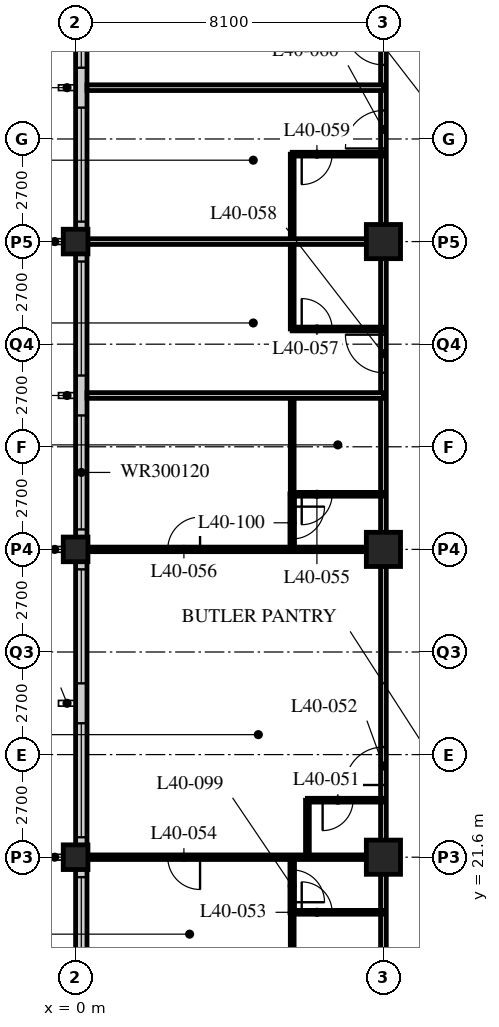
"""IFC4 building model, lengths in metres.
Left out: names, types, materials, properties, quantities, classifications, styles, units other than length and angle.
Written with IfcOpenShell. Run it as: python <this file> out.ifc"""

import sys

from ifc_helpers import new_model, si_unit, direction, frame, frame_2d, origin, origin_2d, place, context, subcontext, project, spatial, rectangle, hollow_rectangle, extrude, element, fill, save


model = new_model("IFC4")
c1 = context("Model", 3, precision=1e-05, world=origin(), true_north=direction((0.0, 1.0)))
c2 = subcontext(c1, "Body", "Model", "MODEL_VIEW")
j1 = project(units=[si_unit("LENGTHUNIT", "METRE"), si_unit("PLANEANGLEUNIT", "RADIAN")], contexts=[c1])
p1 = place(None, origin())
s1 = spatial("IfcSite", under=j1, at=p1, CompositionType="ELEMENT")
p2 = place(p1, origin())
s2 = spatial("IfcBuilding", under=s1, at=p2, CompositionType="ELEMENT")
p3 = place(p2, frame((0.0, 0.0, 154.4)))
s3 = spatial("IfcBuildingStorey", under=s2, at=p3, CompositionType="ELEMENT", Elevation=154.4)
for number, where, z_axis, x_axis in (
    (1, (0.0, 21.6, 0.0), (0.0, 0.0, 1.0), (1.0, 0.0, 0.0)),
    (2, (0.0, 29.7, 0.0), (0.0, 0.0, 1.0), (1.0, 0.0, 0.0)),
    (3, (0.0, 37.8, 0.0), (0.0, 0.0, 1.0), (1.0, 0.0, 0.0)),
):
    element("IfcColumn", number, at=place(p3, frame(where, z_axis=z_axis, x_axis=x_axis)), inside=s3, PredefinedType="COLUMN", context=c2, shape_type="SweptSolid", body=[
        extrude(hollow_rectangle(XDim=0.65, YDim=0.65, WallThickness=0.055, at=origin_2d()), origin(), (0.0, 0.0, 1.0), 3.4),
    ])
for number, where, z_axis, x_axis in (
    (4, (8.1, 21.6, 0.0), (0.0, 0.0, 1.0), (1.0, 0.0, 0.0)),
    (5, (8.1, 29.7, 0.0), (0.0, 0.0, 1.0), (1.0, 0.0, 0.0)),
    (6, (8.1, 37.8, 0.0), (0.0, 0.0, 1.0), (1.0, 0.0, 0.0)),
):
    element("IfcColumn", number, at=place(p3, frame(where, z_axis=z_axis, x_axis=x_axis)), inside=s3, PredefinedType="COLUMN", context=c2, shape_type="SweptSolid", body=[
        extrude(hollow_rectangle(XDim=0.9, YDim=0.9, WallThickness=0.1, at=origin_2d()), origin(), (0.0, 0.0, 1.0), 3.4),
    ])
p4 = place(p3, frame((0.15, 45.6, 0.0), z_axis=(0.0, 0.0, 1.0), x_axis=(0.0, -1.0, 0.0)))
e7 = element("IfcWall", 7, at=p4, inside=s3, PredefinedType="SOLIDWALL", context=c2, shape_type="SweptSolid", body=[
    extrude(rectangle(XDim=32.1, YDim=0.3, at=frame_2d((16.05, 0.0))), origin(), (0.0, 0.0, 1.0), 2.15),
])
p5 = place(p4, frame((0.225, 0.0, 0.9)))
e8 = element("IfcOpeningElement", 8, at=p5, cuts=e7, PredefinedType="OPENING", context=c2, shape_type="SweptSolid", body=[
    extrude(rectangle(XDim=3.0, YDim=1.2, at=frame_2d((1.5, 0.6))), frame((0.0, 0.16, 0.0), z_axis=(0.0, -1.0, 0.0), x_axis=(1.0, 0.0, 0.0)), (0.0, 0.0, 1.0), 0.32),
])
p6 = place(p4, frame((4.275, 0.0, 0.9)))
e9 = element("IfcOpeningElement", 9, at=p6, cuts=e7, PredefinedType="OPENING", context=c2, shape_type="SweptSolid", body=[
    extrude(rectangle(XDim=3.0, YDim=1.2, at=frame_2d((1.5, 0.6))), frame((0.0, 0.16, 0.0), z_axis=(0.0, -1.0, 0.0), x_axis=(1.0, 0.0, 0.0)), (0.0, 0.0, 1.0), 0.32),
])
p7 = place(p4, frame((8.325, 0.0, 0.9)))
e10 = element("IfcOpeningElement", 10, at=p7, cuts=e7, PredefinedType="OPENING", context=c2, shape_type="SweptSolid", body=[
    extrude(rectangle(XDim=3.0, YDim=1.2, at=frame_2d((1.5, 0.6))), frame((0.0, 0.16, 0.0), z_axis=(0.0, -1.0, 0.0), x_axis=(1.0, 0.0, 0.0)), (0.0, 0.0, 1.0), 0.32),
])
p8 = place(p4, frame((12.375, 0.0, 0.9)))
e11 = element("IfcOpeningElement", 11, at=p8, cuts=e7, PredefinedType="OPENING", context=c2, shape_type="SweptSolid", body=[
    extrude(rectangle(XDim=3.0, YDim=1.2, at=frame_2d((1.5, 0.6))), frame((0.0, 0.16, 0.0), z_axis=(0.0, -1.0, 0.0), x_axis=(1.0, 0.0, 0.0)), (0.0, 0.0, 1.0), 0.32),
])
p9 = place(p4, frame((16.425, 0.0, 0.9)))
e12 = element("IfcOpeningElement", 12, at=p9, cuts=e7, PredefinedType="OPENING", context=c2, shape_type="SweptSolid", body=[
    extrude(rectangle(XDim=3.0, YDim=1.2, at=frame_2d((1.5, 0.6))), frame((0.0, 0.16, 0.0), z_axis=(0.0, -1.0, 0.0), x_axis=(1.0, 0.0, 0.0)), (0.0, 0.0, 1.0), 0.32),
])
p10 = place(p4, frame((20.475, 0.0, 0.9)))
e13 = element("IfcOpeningElement", 13, at=p10, cuts=e7, PredefinedType="OPENING", context=c2, shape_type="SweptSolid", body=[
    extrude(rectangle(XDim=3.0, YDim=1.2, at=frame_2d((1.5, 0.6))), frame((0.0, 0.16, 0.0), z_axis=(0.0, -1.0, 0.0), x_axis=(1.0, 0.0, 0.0)), (0.0, 0.0, 1.0), 0.32),
])
p11 = place(p4, frame((24.525, 0.0, 0.9)))
e14 = element("IfcOpeningElement", 14, at=p11, cuts=e7, PredefinedType="OPENING", context=c2, shape_type="SweptSolid", body=[
    extrude(rectangle(XDim=3.0, YDim=1.2, at=frame_2d((1.5, 0.6))), frame((0.0, 0.16, 0.0), z_axis=(0.0, -1.0, 0.0), x_axis=(1.0, 0.0, 0.0)), (0.0, 0.0, 1.0), 0.32),
])
p12 = place(p4, frame((28.575, 0.0, 0.9)))
e15 = element("IfcOpeningElement", 15, at=p12, cuts=e7, PredefinedType="OPENING", context=c2, shape_type="SweptSolid", body=[
    extrude(rectangle(XDim=3.0, YDim=1.2, at=frame_2d((1.5, 0.6))), frame((0.0, 0.16, 0.0), z_axis=(0.0, -1.0, 0.0), x_axis=(1.0, 0.0, 0.0)), (0.0, 0.0, 1.0), 0.32),
])
p13 = place(p3, frame((8.1, 17.55, 0.0), z_axis=(0.0, 0.0, 1.0), x_axis=(0.0, 1.0, 0.0)))
e16 = element("IfcWall", 16, at=p13, inside=s3, PredefinedType="PARTITIONING", context=c2, shape_type="SweptSolid", body=[
    extrude(rectangle(XDim=28.35, YDim=0.15, at=frame_2d((14.175, 0.0))), origin(), (0.0, 0.0, 1.0), 2.15),
])
p14 = place(p13, frame((5.95, 0.0, 0.0)))
e17 = element("IfcOpeningElement", 17, at=p14, cuts=e16, PredefinedType="OPENING", context=c2, shape_type="SweptSolid", body=[
    extrude(rectangle(XDim=1.0, YDim=2.1, at=frame_2d((0.5, 1.05))), frame((0.0, 0.085, 0.0), z_axis=(0.0, -1.0, 0.0), x_axis=(1.0, 0.0, 0.0)), (0.0, 0.0, 1.0), 0.17),
])
p15 = place(p13, frame((16.8, 0.0, 0.0)))
e18 = element("IfcOpeningElement", 18, at=p15, cuts=e16, PredefinedType="OPENING", context=c2, shape_type="SweptSolid", body=[
    extrude(rectangle(XDim=1.0, YDim=2.1, at=frame_2d((0.5, 1.05))), frame((0.0, 0.085, 0.0), z_axis=(0.0, -1.0, 0.0), x_axis=(1.0, 0.0, 0.0)), (0.0, 0.0, 1.0), 0.17),
])
p16 = place(p13, frame((22.7, 0.0, 0.0)))
e19 = element("IfcOpeningElement", 19, at=p16, cuts=e16, PredefinedType="OPENING", context=c2, shape_type="SweptSolid", body=[
    extrude(rectangle(XDim=1.0, YDim=2.1, at=frame_2d((0.5, 1.05))), frame((0.0, 0.085, 0.0), z_axis=(0.0, -1.0, 0.0), x_axis=(1.0, 0.0, 0.0)), (0.0, 0.0, 1.0), 0.17),
])
p17 = place(p13, frame((24.9, 0.0, 0.0)))
e20 = element("IfcOpeningElement", 20, at=p17, cuts=e16, PredefinedType="OPENING", context=c2, shape_type="SweptSolid", body=[
    extrude(rectangle(XDim=1.0, YDim=2.1, at=frame_2d((0.5, 1.05))), frame((0.0, 0.085, 0.0), z_axis=(0.0, -1.0, 0.0), x_axis=(1.0, 0.0, 0.0)), (0.0, 0.0, 1.0), 0.17),
])
p18 = place(p3, frame((6.1, 21.6, 0.0), z_axis=(0.0, 0.0, 1.0), x_axis=(0.0, 1.0, 0.0)))
e21 = element("IfcWall", 21, at=p18, inside=s3, PredefinedType="PARTITIONING", context=c2, shape_type="SweptSolid", body=[
    extrude(rectangle(XDim=1.5, YDim=0.1, at=frame_2d((0.75, 0.0))), origin(), (0.0, 0.0, 1.0), 3.15),
])
p19 = place(p3, frame((8.1, 23.1, 0.0), z_axis=(0.0, 0.0, 1.0), x_axis=(-1.0, 0.0, 0.0)))
e22 = element("IfcWall", 22, at=p19, inside=s3, PredefinedType="PARTITIONING", context=c2, shape_type="SweptSolid", body=[
    extrude(rectangle(XDim=2.0, YDim=0.1, at=frame_2d((1.0, 0.0))), origin(), (0.0, 0.0, 1.0), 3.15),
])
p20 = place(p19, frame((0.8, 0.0, 0.0)))
e23 = element("IfcOpeningElement", 23, at=p20, cuts=e22, PredefinedType="OPENING", context=c2, shape_type="SweptSolid", body=[
    extrude(rectangle(XDim=0.8, YDim=2.1, at=frame_2d((0.4, 1.05))), frame((0.0, 0.06, 0.0), z_axis=(0.0, -1.0, 0.0), x_axis=(1.0, 0.0, 0.0)), (0.0, 0.0, 1.0), 0.12),
])
p21 = place(p3, frame((5.7, 17.55, 0.0), z_axis=(0.0, 0.0, 1.0), x_axis=(0.0, 1.0, 0.0)))
e24 = element("IfcWall", 24, at=p21, inside=s3, PredefinedType="PARTITIONING", context=c2, shape_type="SweptSolid", body=[
    extrude(rectangle(XDim=2.6, YDim=0.1, at=frame_2d((1.3, 0.0))), origin(), (0.0, 0.0, 1.0), 3.15),
])
p22 = place(p3, frame((8.1, 20.15, 0.0), z_axis=(0.0, 0.0, 1.0), x_axis=(-1.0, 0.0, 0.0)))
e25 = element("IfcWall", 25, at=p22, inside=s3, PredefinedType="PARTITIONING", context=c2, shape_type="SweptSolid", body=[
    extrude(rectangle(XDim=2.4, YDim=0.1, at=frame_2d((1.2, 0.0))), origin(), (0.0, 0.0, 1.0), 3.15),
])
p23 = place(p22, frame((1.35, 0.0, 0.0)))
e26 = element("IfcOpeningElement", 26, at=p23, cuts=e25, PredefinedType="OPENING", context=c2, shape_type="SweptSolid", body=[
    extrude(rectangle(XDim=0.8, YDim=2.1, at=frame_2d((0.4, 1.05))), frame((0.0, 0.06, 0.0), z_axis=(0.0, -1.0, 0.0), x_axis=(1.0, 0.0, 0.0)), (0.0, 0.0, 1.0), 0.12),
])
p24 = place(p3, frame((8.1, 21.6, 0.0), z_axis=(0.0, 0.0, 1.0), x_axis=(-1.0, 0.0, 0.0)))
e27 = element("IfcWall", 27, at=p24, inside=s3, PredefinedType="PARTITIONING", context=c2, shape_type="SweptSolid", body=[
    extrude(rectangle(XDim=7.8, YDim=0.12, at=frame_2d((3.9, 0.0))), origin(), (0.0, 0.0, 1.0), 2.15),
])
p25 = place(p24, frame((4.825, 0.0, 0.0)))
e28 = element("IfcOpeningElement", 28, at=p25, cuts=e27, PredefinedType="OPENING", context=c2, shape_type="SweptSolid", body=[
    extrude(rectangle(XDim=0.85, YDim=2.1, at=frame_2d((0.425, 1.05))), frame((0.0, 0.07, 0.0), z_axis=(0.0, -1.0, 0.0), x_axis=(1.0, 0.0, 0.0)), (0.0, 0.0, 1.0), 0.14),
])
p26 = place(p3, frame((5.7, 31.15, 0.0), z_axis=(0.0, 0.0, 1.0), x_axis=(0.0, 1.0, 0.0)))
e29 = element("IfcWall", 29, at=p26, inside=s3, PredefinedType="PARTITIONING", context=c2, shape_type="SweptSolid", body=[
    extrude(rectangle(XDim=2.6, YDim=0.1, at=frame_2d((1.3, 0.0))), origin(), (0.0, 0.0, 1.0), 3.15),
])
p27 = place(p3, frame((8.1, 31.15, 0.0), z_axis=(0.0, 0.0, 1.0), x_axis=(-1.0, 0.0, 0.0)))
e30 = element("IfcWall", 30, at=p27, inside=s3, PredefinedType="PARTITIONING", context=c2, shape_type="SweptSolid", body=[
    extrude(rectangle(XDim=2.4, YDim=0.1, at=frame_2d((1.2, 0.0))), origin(), (0.0, 0.0, 1.0), 3.15),
])
p28 = place(p27, frame((1.35, 0.0, 0.0)))
e31 = element("IfcOpeningElement", 31, at=p28, cuts=e30, PredefinedType="OPENING", context=c2, shape_type="SweptSolid", body=[
    extrude(rectangle(XDim=0.8, YDim=2.1, at=frame_2d((0.4, 1.05))), frame((0.0, 0.06, 0.0), z_axis=(0.0, -1.0, 0.0), x_axis=(1.0, 0.0, 0.0)), (0.0, 0.0, 1.0), 0.12),
])
p29 = place(p3, frame((8.1, 29.7, 0.0), z_axis=(0.0, 0.0, 1.0), x_axis=(-1.0, 0.0, 0.0)))
e32 = element("IfcWall", 32, at=p29, inside=s3, PredefinedType="PARTITIONING", context=c2, shape_type="SweptSolid", body=[
    extrude(rectangle(XDim=7.8, YDim=0.12, at=frame_2d((3.9, 0.0))), origin(), (0.0, 0.0, 1.0), 2.38),
])
p30 = place(p29, frame((4.825, 0.0, 0.0)))
e33 = element("IfcOpeningElement", 33, at=p30, cuts=e32, PredefinedType="OPENING", context=c2, shape_type="SweptSolid", body=[
    extrude(rectangle(XDim=0.85, YDim=2.1, at=frame_2d((0.425, 1.05))), frame((0.0, 0.07, 0.0), z_axis=(0.0, -1.0, 0.0), x_axis=(1.0, 0.0, 0.0)), (0.0, 0.0, 1.0), 0.14),
])
p31 = place(p3, frame((8.1, 33.75, 0.0), z_axis=(0.0, 0.0, 1.0), x_axis=(-1.0, 0.0, 0.0)))
e34 = element("IfcWall", 34, at=p31, inside=s3, PredefinedType="PARTITIONING", context=c2, shape_type="SweptSolid", body=[
    extrude(rectangle(XDim=7.8, YDim=0.15, at=frame_2d((3.9, 0.0))), origin(), (0.0, 0.0, 1.0), 3.15),
])
p32 = place(p3, frame((5.7, 35.5, 0.0), z_axis=(0.0, 0.0, 1.0), x_axis=(0.0, 1.0, 0.0)))
e35 = element("IfcWall", 35, at=p32, inside=s3, PredefinedType="PARTITIONING", context=c2, shape_type="SweptSolid", body=[
    extrude(rectangle(XDim=4.6, YDim=0.1, at=frame_2d((2.3, 0.0))), origin(), (0.0, 0.0, 1.0), 3.15),
])
p33 = place(p3, frame((8.1, 35.5, 0.0), z_axis=(0.0, 0.0, 1.0), x_axis=(-1.0, 0.0, 0.0)))
e36 = element("IfcWall", 36, at=p33, inside=s3, PredefinedType="PARTITIONING", context=c2, shape_type="SweptSolid", body=[
    extrude(rectangle(XDim=2.4, YDim=0.1, at=frame_2d((1.2, 0.0))), origin(), (0.0, 0.0, 1.0), 3.15),
])
p34 = place(p33, frame((1.35, 0.0, 0.0)))
e37 = element("IfcOpeningElement", 37, at=p34, cuts=e36, PredefinedType="OPENING", context=c2, shape_type="SweptSolid", body=[
    extrude(rectangle(XDim=0.8, YDim=2.1, at=frame_2d((0.4, 1.05))), frame((0.0, 0.06, 0.0), z_axis=(0.0, -1.0, 0.0), x_axis=(1.0, 0.0, 0.0)), (0.0, 0.0, 1.0), 0.12),
])
p35 = place(p3, frame((8.1, 37.8, 0.0), z_axis=(0.0, 0.0, 1.0), x_axis=(-1.0, 0.0, 0.0)))
e38 = element("IfcWall", 38, at=p35, inside=s3, PredefinedType="PARTITIONING", context=c2, shape_type="SweptSolid", body=[
    extrude(rectangle(XDim=7.8, YDim=0.15, at=frame_2d((3.9, 0.0))), origin(), (0.0, 0.0, 1.0), 2.38),
])
p36 = place(p3, frame((8.1, 40.1, 0.0), z_axis=(0.0, 0.0, 1.0), x_axis=(-1.0, 0.0, 0.0)))
e39 = element("IfcWall", 39, at=p36, inside=s3, PredefinedType="PARTITIONING", context=c2, shape_type="SweptSolid", body=[
    extrude(rectangle(XDim=2.4, YDim=0.1, at=frame_2d((1.2, 0.0))), origin(), (0.0, 0.0, 1.0), 3.15),
])
p37 = place(p36, frame((1.35, 0.0, 0.0)))
e40 = element("IfcOpeningElement", 40, at=p37, cuts=e39, PredefinedType="OPENING", context=c2, shape_type="SweptSolid", body=[
    extrude(rectangle(XDim=0.8, YDim=2.1, at=frame_2d((0.4, 1.05))), frame((0.0, 0.06, 0.0), z_axis=(0.0, -1.0, 0.0), x_axis=(1.0, 0.0, 0.0)), (0.0, 0.0, 1.0), 0.12),
])
p38 = place(p3, frame((8.1, 41.85, 0.0), z_axis=(0.0, 0.0, 1.0), x_axis=(-1.0, 0.0, 0.0)))
e41 = element("IfcWall", 41, at=p38, inside=s3, PredefinedType="PARTITIONING", context=c2, shape_type="SweptSolid", body=[
    extrude(rectangle(XDim=7.8, YDim=0.15, at=frame_2d((3.9, 0.0))), origin(), (0.0, 0.0, 1.0), 3.15),
])
p39 = place(p3, frame((5.7, 20.14, 0.0), z_axis=(0.0, 0.0, 1.0), x_axis=(0.0, 1.0, 0.0)))
e42 = element("IfcWall", 42, at=p39, inside=s3, PredefinedType="PARTITIONING", context=c2, shape_type="SweptSolid", body=[
    extrude(rectangle(XDim=1.46, YDim=0.12, at=frame_2d((0.73, 0.0))), origin(), (0.0, 0.0, 1.0), 3.15),
])
p40 = place(p39, frame((0.275, 0.0, 0.0)))
e43 = element("IfcOpeningElement", 43, at=p40, cuts=e42, PredefinedType="OPENING", context=c2, shape_type="SweptSolid", body=[
    extrude(rectangle(XDim=0.85, YDim=2.1, at=frame_2d((0.425, 1.05))), frame((0.0, 0.07, 0.0), z_axis=(0.0, -1.0, 0.0), x_axis=(1.0, 0.0, 0.0)), (0.0, 0.0, 1.0), 0.14),
])
p41 = place(p3, frame((5.7, 29.7, 0.0), z_axis=(0.0, 0.0, 1.0), x_axis=(0.0, 1.0, 0.0)))
e44 = element("IfcWall", 44, at=p41, inside=s3, PredefinedType="PARTITIONING", context=c2, shape_type="SweptSolid", body=[
    extrude(rectangle(XDim=1.46, YDim=0.12, at=frame_2d((0.73, 0.0))), origin(), (0.0, 0.0, 1.0), 3.15),
])
p42 = place(p41, frame((0.275, 0.0, 0.0)))
e45 = element("IfcOpeningElement", 45, at=p42, cuts=e44, PredefinedType="OPENING", context=c2, shape_type="SweptSolid", body=[
    extrude(rectangle(XDim=0.85, YDim=2.1, at=frame_2d((0.425, 1.05))), frame((0.0, 0.07, 0.0), z_axis=(0.0, -1.0, 0.0), x_axis=(1.0, 0.0, 0.0)), (0.0, 0.0, 1.0), 0.14),
])
p43 = place(p5, origin())
e46 = element("IfcWindow", 46, at=p43, inside=s3, PartitioningType="SINGLE_PANEL", PredefinedType="WINDOW", context=c2, shape_type="SweptSolid", body=[
    extrude(rectangle(XDim=3.0, YDim=1.2, at=frame_2d((1.5, 0.6))), frame((0.0, 0.03, 0.0), z_axis=(0.0, -1.0, 0.0), x_axis=(1.0, 0.0, 0.0)), (0.0, 0.0, 1.0), 0.06),
])
fill(e8, e46)
p44 = place(p6, origin())
e47 = element("IfcWindow", 47, at=p44, inside=s3, PartitioningType="SINGLE_PANEL", PredefinedType="WINDOW", context=c2, shape_type="SweptSolid", body=[
    extrude(rectangle(XDim=3.0, YDim=1.2, at=frame_2d((1.5, 0.6))), frame((0.0, 0.03, 0.0), z_axis=(0.0, -1.0, 0.0), x_axis=(1.0, 0.0, 0.0)), (0.0, 0.0, 1.0), 0.06),
])
fill(e9, e47)
p45 = place(p7, origin())
e48 = element("IfcWindow", 48, at=p45, inside=s3, PartitioningType="SINGLE_PANEL", PredefinedType="WINDOW", context=c2, shape_type="SweptSolid", body=[
    extrude(rectangle(XDim=3.0, YDim=1.2, at=frame_2d((1.5, 0.6))), frame((0.0, 0.03, 0.0), z_axis=(0.0, -1.0, 0.0), x_axis=(1.0, 0.0, 0.0)), (0.0, 0.0, 1.0), 0.06),
])
fill(e10, e48)
p46 = place(p8, origin())
e49 = element("IfcWindow", 49, at=p46, inside=s3, PartitioningType="SINGLE_PANEL", PredefinedType="WINDOW", context=c2, shape_type="SweptSolid", body=[
    extrude(rectangle(XDim=3.0, YDim=1.2, at=frame_2d((1.5, 0.6))), frame((0.0, 0.03, 0.0), z_axis=(0.0, -1.0, 0.0), x_axis=(1.0, 0.0, 0.0)), (0.0, 0.0, 1.0), 0.06),
])
fill(e11, e49)
p47 = place(p9, origin())
e50 = element("IfcWindow", 50, at=p47, inside=s3, PartitioningType="SINGLE_PANEL", PredefinedType="WINDOW", context=c2, shape_type="SweptSolid", body=[
    extrude(rectangle(XDim=3.0, YDim=1.2, at=frame_2d((1.5, 0.6))), frame((0.0, 0.03, 0.0), z_axis=(0.0, -1.0, 0.0), x_axis=(1.0, 0.0, 0.0)), (0.0, 0.0, 1.0), 0.06),
])
fill(e12, e50)
p48 = place(p10, origin())
e51 = element("IfcWindow", 51, at=p48, inside=s3, PartitioningType="SINGLE_PANEL", PredefinedType="WINDOW", context=c2, shape_type="SweptSolid", body=[
    extrude(rectangle(XDim=3.0, YDim=1.2, at=frame_2d((1.5, 0.6))), frame((0.0, 0.03, 0.0), z_axis=(0.0, -1.0, 0.0), x_axis=(1.0, 0.0, 0.0)), (0.0, 0.0, 1.0), 0.06),
])
fill(e13, e51)
p49 = place(p11, origin())
e52 = element("IfcWindow", 52, at=p49, inside=s3, PartitioningType="SINGLE_PANEL", PredefinedType="WINDOW", context=c2, shape_type="SweptSolid", body=[
    extrude(rectangle(XDim=3.0, YDim=1.2, at=frame_2d((1.5, 0.6))), frame((0.0, 0.03, 0.0), z_axis=(0.0, -1.0, 0.0), x_axis=(1.0, 0.0, 0.0)), (0.0, 0.0, 1.0), 0.06),
])
fill(e14, e52)
p50 = place(p20, origin())
e53 = element("IfcDoor", 53, at=p50, inside=s3, OperationType="SINGLE_SWING_RIGHT", PredefinedType="DOOR", context=c2, shape_type="SweptSolid", body=[
    extrude(rectangle(XDim=0.8, YDim=2.1, at=frame_2d((0.4, 1.05))), frame((0.0, 0.025, 0.0), z_axis=(0.0, -1.0, 0.0), x_axis=(1.0, 0.0, 0.0)), (0.0, 0.0, 1.0), 0.05),
])
fill(e23, e53)
p51 = place(p14, origin())
e54 = element("IfcDoor", 54, at=p51, inside=s3, OperationType="SINGLE_SWING_LEFT", PredefinedType="DOOR", context=c2, shape_type="SweptSolid", body=[
    extrude(rectangle(XDim=1.0, YDim=2.1, at=frame_2d((0.5, 1.05))), frame((0.0, 0.025, 0.0), z_axis=(0.0, -1.0, 0.0), x_axis=(1.0, 0.0, 0.0)), (0.0, 0.0, 1.0), 0.05),
])
fill(e17, e54)
p52 = place(p23, origin())
e55 = element("IfcDoor", 55, at=p52, inside=s3, OperationType="SINGLE_SWING_LEFT", PredefinedType="DOOR", context=c2, shape_type="SweptSolid", body=[
    extrude(rectangle(XDim=0.8, YDim=2.1, at=frame_2d((0.4, 1.05))), frame((0.0, 0.025, 0.0), z_axis=(0.0, -1.0, 0.0), x_axis=(1.0, 0.0, 0.0)), (0.0, 0.0, 1.0), 0.05),
])
fill(e26, e55)
p53 = place(p25, origin())
e56 = element("IfcDoor", 56, at=p53, inside=s3, OperationType="SINGLE_SWING_LEFT", PredefinedType="DOOR", context=c2, shape_type="SweptSolid", body=[
    extrude(rectangle(XDim=0.85, YDim=2.1, at=frame_2d((0.425, 1.05))), frame((0.0, 0.025, 0.0), z_axis=(0.0, -1.0, 0.0), x_axis=(1.0, 0.0, 0.0)), (0.0, 0.0, 1.0), 0.05),
])
fill(e28, e56)
p54 = place(p28, origin())
e57 = element("IfcDoor", 57, at=p54, inside=s3, OperationType="SINGLE_SWING_RIGHT", PredefinedType="DOOR", context=c2, shape_type="SweptSolid", body=[
    extrude(rectangle(XDim=0.8, YDim=2.1, at=frame_2d((0.4, 1.05))), frame((0.0, 0.025, 0.0), z_axis=(0.0, -1.0, 0.0), x_axis=(1.0, 0.0, 0.0)), (0.0, 0.0, 1.0), 0.05),
])
fill(e31, e57)
p55 = place(p30, origin())
e58 = element("IfcDoor", 58, at=p55, inside=s3, OperationType="SINGLE_SWING_RIGHT", PredefinedType="DOOR", context=c2, shape_type="SweptSolid", body=[
    extrude(rectangle(XDim=0.85, YDim=2.1, at=frame_2d((0.425, 1.05))), frame((0.0, 0.025, 0.0), z_axis=(0.0, -1.0, 0.0), x_axis=(1.0, 0.0, 0.0)), (0.0, 0.0, 1.0), 0.05),
])
fill(e33, e58)
p56 = place(p34, origin())
e59 = element("IfcDoor", 59, at=p56, inside=s3, OperationType="SINGLE_SWING_LEFT", PredefinedType="DOOR", context=c2, shape_type="SweptSolid", body=[
    extrude(rectangle(XDim=0.8, YDim=2.1, at=frame_2d((0.4, 1.05))), frame((0.0, 0.025, 0.0), z_axis=(0.0, -1.0, 0.0), x_axis=(1.0, 0.0, 0.0)), (0.0, 0.0, 1.0), 0.05),
])
fill(e37, e59)
p57 = place(p15, origin())
e60 = element("IfcDoor", 60, at=p57, inside=s3, OperationType="SINGLE_SWING_RIGHT", PredefinedType="DOOR", context=c2, shape_type="SweptSolid", body=[
    extrude(rectangle(XDim=1.0, YDim=2.1, at=frame_2d((0.5, 1.05))), frame((0.0, 0.025, 0.0), z_axis=(0.0, -1.0, 0.0), x_axis=(1.0, 0.0, 0.0)), (0.0, 0.0, 1.0), 0.05),
])
fill(e18, e60)
p58 = place(p37, origin())
e61 = element("IfcDoor", 61, at=p58, inside=s3, OperationType="SINGLE_SWING_RIGHT", PredefinedType="DOOR", context=c2, shape_type="SweptSolid", body=[
    extrude(rectangle(XDim=0.8, YDim=2.1, at=frame_2d((0.4, 1.05))), frame((0.0, 0.025, 0.0), z_axis=(0.0, -1.0, 0.0), x_axis=(1.0, 0.0, 0.0)), (0.0, 0.0, 1.0), 0.05),
])
fill(e40, e61)
p59 = place(p16, origin())
e62 = element("IfcDoor", 62, at=p59, inside=s3, OperationType="SINGLE_SWING_LEFT", PredefinedType="DOOR", context=c2, shape_type="SweptSolid", body=[
    extrude(rectangle(XDim=1.0, YDim=2.1, at=frame_2d((0.5, 1.05))), frame((0.0, 0.025, 0.0), z_axis=(0.0, -1.0, 0.0), x_axis=(1.0, 0.0, 0.0)), (0.0, 0.0, 1.0), 0.05),
])
fill(e19, e62)
p60 = place(p17, origin())
e63 = element("IfcDoor", 63, at=p60, inside=s3, OperationType="SINGLE_SWING_RIGHT", PredefinedType="DOOR", context=c2, shape_type="SweptSolid", body=[
    extrude(rectangle(XDim=1.0, YDim=2.1, at=frame_2d((0.5, 1.05))), frame((0.0, 0.025, 0.0), z_axis=(0.0, -1.0, 0.0), x_axis=(1.0, 0.0, 0.0)), (0.0, 0.0, 1.0), 0.05),
])
fill(e20, e63)
p61 = place(p40, origin())
e64 = element("IfcDoor", 64, at=p61, inside=s3, OperationType="SINGLE_SWING_RIGHT", PredefinedType="DOOR", context=c2, shape_type="SweptSolid", body=[
    extrude(rectangle(XDim=0.85, YDim=2.1, at=frame_2d((0.425, 1.05))), frame((0.0, 0.025, 0.0), z_axis=(0.0, -1.0, 0.0), x_axis=(1.0, 0.0, 0.0)), (0.0, 0.0, 1.0), 0.05),
])
fill(e43, e64)
p62 = place(p42, origin())
e65 = element("IfcDoor", 65, at=p62, inside=s3, OperationType="SINGLE_SWING_LEFT", PredefinedType="DOOR", context=c2, shape_type="SweptSolid", body=[
    extrude(rectangle(XDim=0.85, YDim=2.1, at=frame_2d((0.425, 1.05))), frame((0.0, 0.025, 0.0), z_axis=(0.0, -1.0, 0.0), x_axis=(1.0, 0.0, 0.0)), (0.0, 0.0, 1.0), 0.05),
])
fill(e45, e65)
save(model, sys.argv[1])
